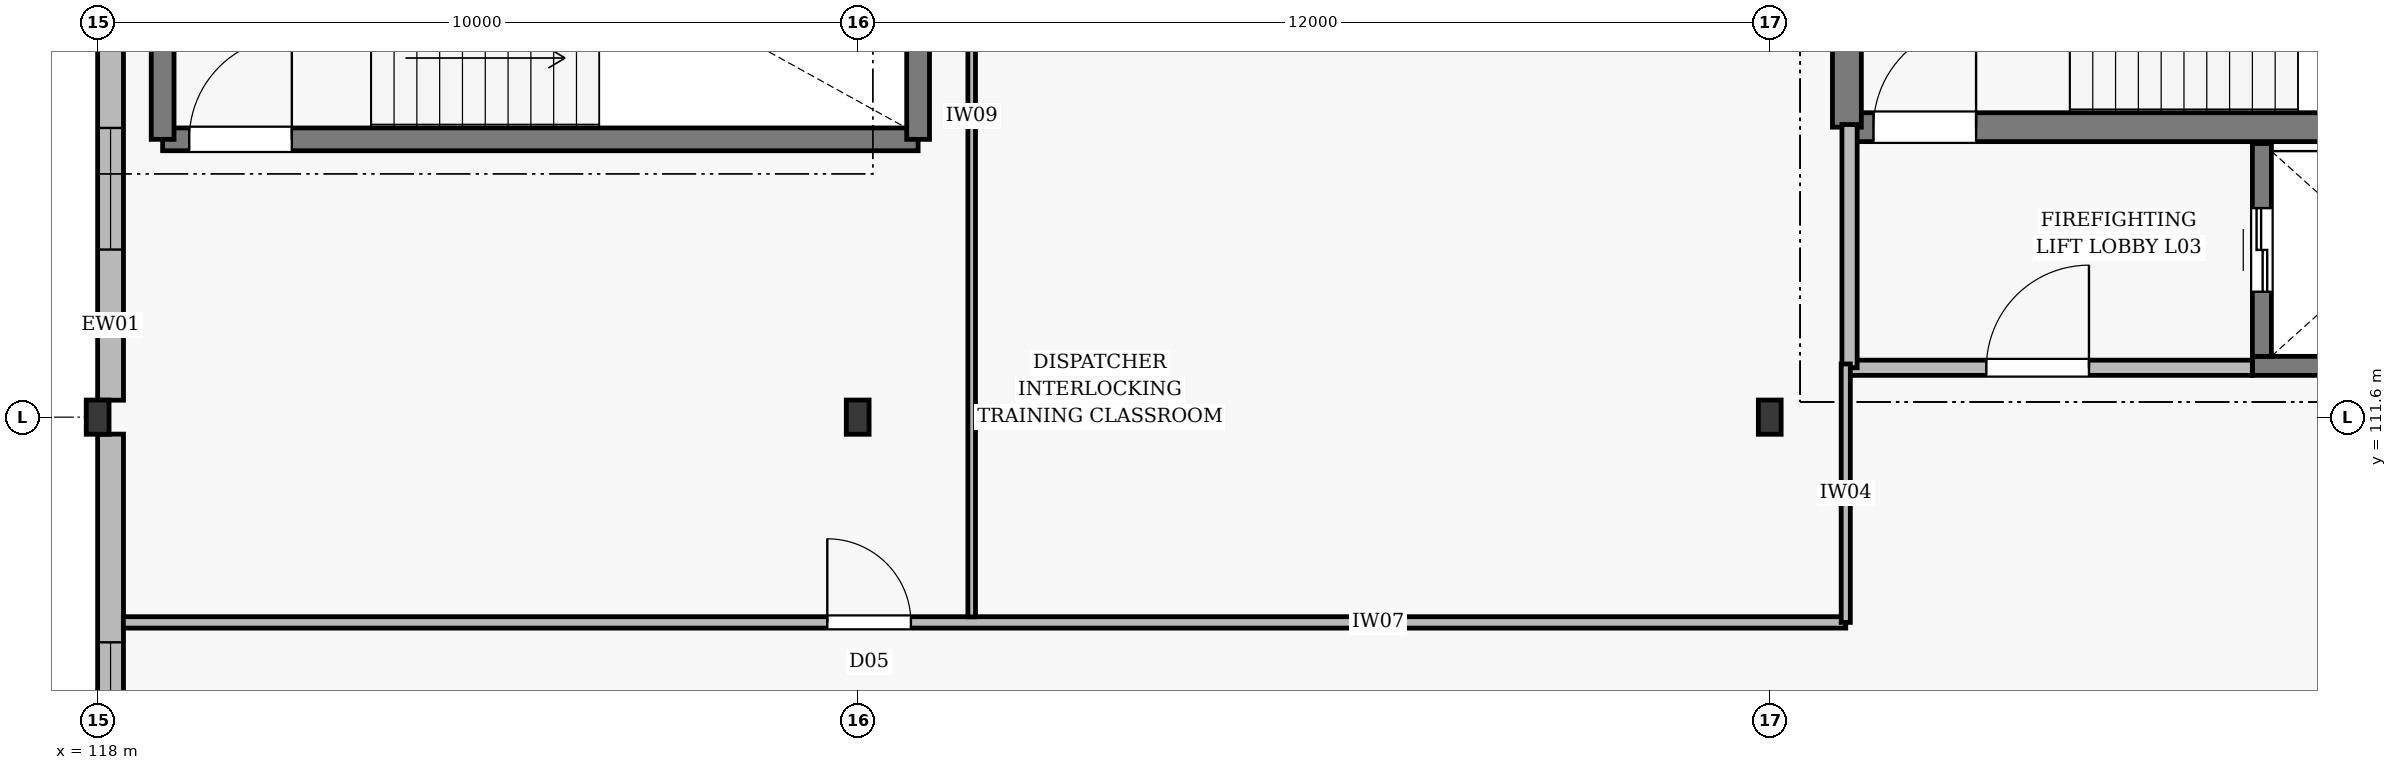
"""IFC4 building model, lengths in metres.
Left out: names, types, materials, properties, quantities, classifications, styles, units other than length and angle.
Written with IfcOpenShell. Run it as: python <this file> out.ifc"""

import sys

from ifc_helpers import new_model, si_unit, direction, frame, frame_2d, origin, origin_2d, place, context, subcontext, project, spatial, rectangle, i_section, extrude, element, fill, save


model = new_model("IFC4")
c1 = context("Model", 3, precision=1e-05, world=origin(), true_north=direction((0.0, 1.0)))
c2 = subcontext(c1, "Body", "Model", "MODEL_VIEW")
j1 = project(units=[si_unit("LENGTHUNIT", "METRE"), si_unit("PLANEANGLEUNIT", "RADIAN")], contexts=[c1])
p1 = place(None, origin())
s1 = spatial("IfcSite", under=j1, at=p1, CompositionType="ELEMENT")
p2 = place(p1, origin())
s2 = spatial("IfcBuilding", under=s1, at=p2, CompositionType="ELEMENT")
p3 = place(p2, frame((0.0, 0.0, 17.4)))
s3 = spatial("IfcBuildingStorey", under=s2, at=p3, CompositionType="ELEMENT", Elevation=17.4)
for number, where, z_axis, x_axis in (
    (1, (118.0, 111.6, 0.0), (0.0, 0.0, 1.0), (1.0, 0.0, 0.0)),
    (2, (128.0, 111.6, 0.0), (0.0, 0.0, 1.0), (1.0, 0.0, 0.0)),
    (3, (140.0, 111.6, 0.0), (0.0, 0.0, 1.0), (1.0, 0.0, 0.0)),
):
    element("IfcColumn", number, at=place(p3, frame(where, z_axis=z_axis, x_axis=x_axis)), inside=s3, PredefinedType="COLUMN", context=c2, shape_type="SweptSolid", body=[
        extrude(i_section(OverallWidth=0.3, OverallDepth=0.45, WebThickness=0.014, FlangeThickness=0.026, at=origin_2d()), origin(), (0.0, 0.0, 1.0), 3.9),
    ])
p4 = place(p3, frame((118.17, 101.023, 0.0), z_axis=(0.0, 0.0, 1.0), x_axis=(0.0, 1.0, 0.0)))
e4 = element("IfcWall", 4, at=p4, inside=s3, PredefinedType="STANDARD", context=c2, shape_type="SweptSolid", body=[
    extrude(rectangle(XDim=10.354, YDim=0.34, at=frame_2d((5.177, 0.0))), origin(), (0.0, 0.0, 1.0), 3.22),
])
p5 = place(p4, frame((5.015, 0.0, 0.58)))
e5 = element("IfcOpeningElement", 5, at=p5, cuts=e4, PredefinedType="OPENING", context=c2, shape_type="SweptSolid", body=[
    extrude(rectangle(XDim=2.6, YDim=2.4, at=frame_2d((1.3, 1.2))), frame((0.0, 0.182, 0.0), z_axis=(0.0, -1.0, 0.0), x_axis=(1.0, 0.0, 0.0)), (0.0, 0.0, 1.0), 0.364),
])
p6 = place(p3, frame((118.17, 111.823, 0.0), z_axis=(0.0, 0.0, 1.0), x_axis=(0.0, 1.0, 0.0)))
e6 = element("IfcWall", 6, at=p6, inside=s3, PredefinedType="STANDARD", context=c2, shape_type="SweptSolid", body=[
    extrude(rectangle(XDim=10.329, YDim=0.34, at=frame_2d((5.165, 0.0))), origin(), (0.0, 0.0, 1.0), 3.22),
])
p7 = place(p6, frame((1.982, 0.0, 0.75)))
e7 = element("IfcOpeningElement", 7, at=p7, cuts=e6, PredefinedType="OPENING", context=c2, shape_type="SweptSolid", body=[
    extrude(rectangle(XDim=1.6, YDim=2.1, at=frame_2d((0.8, 1.05))), frame((0.0, 0.182, 0.0), z_axis=(0.0, -1.0, 0.0), x_axis=(1.0, 0.0, 0.0)), (0.0, 0.0, 1.0), 0.364),
])
p8 = place(p6, frame((6.747, 0.0, 0.75)))
e8 = element("IfcOpeningElement", 8, at=p8, cuts=e6, PredefinedType="OPENING", context=c2, shape_type="SweptSolid", body=[
    extrude(rectangle(XDim=1.6, YDim=2.1, at=frame_2d((0.8, 1.05))), frame((0.0, 0.182, 0.0), z_axis=(0.0, -1.0, 0.0), x_axis=(1.0, 0.0, 0.0)), (0.0, 0.0, 1.0), 0.364),
])
p9 = place(p3, frame((141.015, 115.415, 0.0), z_axis=(0.0, 0.0, 1.0), x_axis=(1.0, 0.0, 0.0)))
e9 = element("IfcWall", 9, at=p9, inside=s3, PredefinedType="SOLIDWALL", context=c2, shape_type="SweptSolid", body=[
    extrude(rectangle(XDim=10.17, YDim=0.38, at=frame_2d((5.085, 0.0))), origin(), (0.0, 0.0, 1.0), 3.9),
])
p10 = place(p9, frame((0.35, 0.0, 0.005)))
e10 = element("IfcOpeningElement", 10, at=p10, cuts=e9, PredefinedType="OPENING", context=c2, shape_type="SweptSolid", body=[
    extrude(rectangle(XDim=1.35, YDim=2.15, at=frame_2d((0.675, 1.075))), frame((0.0, 0.202, 0.0), z_axis=(0.0, -1.0, 0.0), x_axis=(1.0, 0.0, 0.0)), (0.0, 0.0, 1.0), 0.404),
])
p11 = place(p3, frame((141.015, 115.415, 0.0), z_axis=(0.0, 0.0, 1.0), x_axis=(0.0, 1.0, 0.0)))
e11 = element("IfcWall", 11, at=p11, inside=s3, PredefinedType="SOLIDWALL", context=c2, shape_type="SweptSolid", body=[
    extrude(rectangle(XDim=4.47, YDim=0.38, at=frame_2d((2.235, 0.0))), origin(), (0.0, 0.0, 1.0), 3.9),
])
p12 = place(p3, frame((118.855, 115.255, 0.0), z_axis=(0.0, 0.0, 1.0), x_axis=(1.0, 0.0, 0.0)))
e12 = element("IfcWall", 12, at=p12, inside=s3, PredefinedType="SOLIDWALL", context=c2, shape_type="SweptSolid", body=[
    extrude(rectangle(XDim=9.94, YDim=0.3, at=frame_2d((4.97, 0.0))), origin(), (0.0, 0.0, 1.0), 3.9),
])
p13 = place(p12, frame((0.35, 0.0, 0.005)))
e13 = element("IfcOpeningElement", 13, at=p13, cuts=e12, PredefinedType="OPENING", context=c2, shape_type="SweptSolid", body=[
    extrude(rectangle(XDim=1.35, YDim=2.15, at=frame_2d((0.675, 1.075))), frame((0.0, 0.162, 0.0), z_axis=(0.0, -1.0, 0.0), x_axis=(1.0, 0.0, 0.0)), (0.0, 0.0, 1.0), 0.324),
])
for number, where, z_axis, x_axis in (
    (14, (118.855, 115.255, 0.0), (0.0, 0.0, 1.0), (0.0, 1.0, 0.0)),
    (15, (128.795, 115.255, 0.0), (0.0, 0.0, 1.0), (0.0, 1.0, 0.0)),
):
    element("IfcWall", number, at=place(p3, frame(where, z_axis=z_axis, x_axis=x_axis)), inside=s3, PredefinedType="SOLIDWALL", context=c2, shape_type="SweptSolid", body=[
        extrude(rectangle(XDim=4.19, YDim=0.3, at=frame_2d((2.095, 0.0))), origin(), (0.0, 0.0, 1.0), 3.9),
    ])
p14 = place(p3, frame((146.35, 112.275, 0.0), z_axis=(0.0, 0.0, 1.0), x_axis=(1.0, 0.0, 0.0)))
e16 = element("IfcWall", 16, at=p14, inside=s3, PredefinedType="SOLIDWALL", context=c2, shape_type="SweptSolid", body=[
    extrude(rectangle(XDim=3.5, YDim=0.25, at=frame_2d((1.75, 0.0))), origin(), (0.0, 0.0, 1.0), 3.9),
])
p15 = place(p3, frame((146.475, 112.4, 0.0), z_axis=(0.0, 0.0, 1.0), x_axis=(0.0, 1.0, 0.0)))
e17 = element("IfcWall", 17, at=p15, inside=s3, PredefinedType="SOLIDWALL", context=c2, shape_type="SweptSolid", body=[
    extrude(rectangle(XDim=2.8, YDim=0.25, at=frame_2d((1.4, 0.0))), origin(), (0.0, 0.0, 1.0), 3.9),
])
p16 = place(p15, frame((0.85, 0.0, 0.005)))
e18 = element("IfcOpeningElement", 18, at=p16, cuts=e17, PredefinedType="OPENING", context=c2, shape_type="SweptSolid", body=[
    extrude(rectangle(XDim=1.1, YDim=2.15, at=frame_2d((0.55, 1.075))), frame((0.0, 0.137, 0.0), z_axis=(0.0, -1.0, 0.0), x_axis=(1.0, 0.0, 0.0)), (0.0, 0.0, 1.0), 0.274),
])
p17 = place(p3, frame((141.05, 112.25, 0.0), z_axis=(0.0, 0.0, 1.0), x_axis=(1.0, 0.0, 0.0)))
e19 = element("IfcWall", 19, at=p17, inside=s3, PredefinedType="PARTITIONING", context=c2, shape_type="SweptSolid", body=[
    extrude(rectangle(XDim=5.3, YDim=0.2, at=frame_2d((2.65, 0.0))), origin(), (0.0, 0.0, 1.0), 3.5),
])
p18 = place(p17, frame((1.8, 0.0, 0.005)))
e20 = element("IfcOpeningElement", 20, at=p18, cuts=e19, PredefinedType="OPENING", context=c2, shape_type="SweptSolid", body=[
    extrude(rectangle(XDim=1.35, YDim=2.15, at=frame_2d((0.675, 1.075))), frame((0.0, 0.112, 0.0), z_axis=(0.0, -1.0, 0.0), x_axis=(1.0, 0.0, 0.0)), (0.0, 0.0, 1.0), 0.224),
])
p19 = place(p3, frame((141.05, 112.25, 0.0), z_axis=(0.0, 0.0, 1.0), x_axis=(0.0, 1.0, 0.0)))
e21 = element("IfcWall", 21, at=p19, inside=s3, PredefinedType="PARTITIONING", context=c2, shape_type="SweptSolid", body=[
    extrude(rectangle(XDim=3.2, YDim=0.2, at=frame_2d((1.6, 0.0))), origin(), (0.0, 0.0, 1.0), 3.5),
])
p20 = place(p3, frame((118.338, 108.9, 0.0), z_axis=(0.0, 0.0, 1.0), x_axis=(1.0, 0.0, 0.0)))
e22 = element("IfcWall", 22, at=p20, inside=s3, PredefinedType="PARTITIONING", context=c2, shape_type="SweptSolid", body=[
    extrude(rectangle(XDim=22.662, YDim=0.15, at=frame_2d((11.331, 0.0))), origin(), (0.0, 0.0, 1.0), 3.31),
])
p21 = place(p20, frame((9.262, 0.0, 0.005)))
e23 = element("IfcOpeningElement", 23, at=p21, cuts=e22, PredefinedType="OPENING", context=c2, shape_type="SweptSolid", body=[
    extrude(rectangle(XDim=1.1, YDim=2.1, at=frame_2d((0.55, 1.05))), frame((0.0, 0.087, 0.0), z_axis=(0.0, -1.0, 0.0), x_axis=(1.0, 0.0, 0.0)), (0.0, 0.0, 1.0), 0.174),
])
p22 = place(p3, frame((141.0, 108.9, 0.0), z_axis=(0.0, 0.0, 1.0), x_axis=(0.0, 1.0, 0.0)))
e24 = element("IfcWall", 24, at=p22, inside=s3, PredefinedType="PARTITIONING", context=c2, shape_type="SweptSolid", body=[
    extrude(rectangle(XDim=3.4, YDim=0.12, at=frame_2d((1.7, 0.0))), origin(), (0.0, 0.0, 1.0), 3.12),
])
p23 = place(p3, frame((129.5, 108.973, 0.0), z_axis=(0.0, 0.0, 1.0), x_axis=(0.0, 1.0, 0.0)))
e25 = element("IfcWall", 25, at=p23, inside=s3, PredefinedType="MOVABLE", context=c2, shape_type="SweptSolid", body=[
    extrude(rectangle(XDim=13.189, YDim=0.1, at=frame_2d((6.595, 0.0))), origin(), (0.0, 0.0, 1.0), 3.22),
])
p24 = place(p5, origin())
e26 = element("IfcWindow", 26, at=p24, inside=s3, PartitioningType="DOUBLE_PANEL_VERTICAL", PredefinedType="WINDOW", context=c2, shape_type="SweptSolid", body=[
    extrude(rectangle(XDim=2.6, YDim=2.4, at=frame_2d((1.3, 1.2))), frame((0.0, 0.03, 0.0), z_axis=(0.0, -1.0, 0.0), x_axis=(1.0, 0.0, 0.0)), (0.0, 0.0, 1.0), 0.06),
])
fill(e5, e26)
p25 = place(p7, origin())
e27 = element("IfcWindow", 27, at=p25, inside=s3, PartitioningType="DOUBLE_PANEL_VERTICAL", PredefinedType="WINDOW", context=c2, shape_type="SweptSolid", body=[
    extrude(rectangle(XDim=1.6, YDim=2.1, at=frame_2d((0.8, 1.05))), frame((0.0, 0.03, 0.0), z_axis=(0.0, -1.0, 0.0), x_axis=(1.0, 0.0, 0.0)), (0.0, 0.0, 1.0), 0.06),
])
fill(e7, e27)
p26 = place(p10, origin())
e28 = element("IfcDoor", 28, at=p26, inside=s3, OperationType="SINGLE_SWING_RIGHT", PredefinedType="DOOR", context=c2, shape_type="SweptSolid", body=[
    extrude(rectangle(XDim=1.35, YDim=2.15, at=frame_2d((0.675, 1.075))), frame((0.0, 0.025, 0.0), z_axis=(0.0, -1.0, 0.0), x_axis=(1.0, 0.0, 0.0)), (0.0, 0.0, 1.0), 0.05),
])
fill(e10, e28)
p27 = place(p13, origin())
e29 = element("IfcDoor", 29, at=p27, inside=s3, OperationType="SINGLE_SWING_RIGHT", PredefinedType="DOOR", context=c2, shape_type="SweptSolid", body=[
    extrude(rectangle(XDim=1.35, YDim=2.15, at=frame_2d((0.675, 1.075))), frame((0.0, 0.025, 0.0), z_axis=(0.0, -1.0, 0.0), x_axis=(1.0, 0.0, 0.0)), (0.0, 0.0, 1.0), 0.05),
])
fill(e13, e29)
p28 = place(p16, origin())
e30 = element("IfcDoor", 30, at=p28, inside=s3, OperationType="SLIDING_TO_LEFT", PredefinedType="DOOR", context=c2, shape_type="SweptSolid", body=[
    extrude(rectangle(XDim=1.1, YDim=2.15, at=frame_2d((0.55, 1.075))), frame((0.0, 0.025, 0.0), z_axis=(0.0, -1.0, 0.0), x_axis=(1.0, 0.0, 0.0)), (0.0, 0.0, 1.0), 0.05),
])
fill(e18, e30)
p29 = place(p18, origin())
e31 = element("IfcDoor", 31, at=p29, inside=s3, OperationType="SINGLE_SWING_RIGHT", PredefinedType="DOOR", context=c2, shape_type="SweptSolid", body=[
    extrude(rectangle(XDim=1.35, YDim=2.15, at=frame_2d((0.675, 1.075))), frame((0.0, 0.025, 0.0), z_axis=(0.0, -1.0, 0.0), x_axis=(1.0, 0.0, 0.0)), (0.0, 0.0, 1.0), 0.05),
])
fill(e20, e31)
p30 = place(p21, origin())
e32 = element("IfcDoor", 32, at=p30, inside=s3, OperationType="SINGLE_SWING_LEFT", PredefinedType="DOOR", context=c2, shape_type="SweptSolid", body=[
    extrude(rectangle(XDim=1.1, YDim=2.1, at=frame_2d((0.55, 1.05))), frame((0.0, 0.025, 0.0), z_axis=(0.0, -1.0, 0.0), x_axis=(1.0, 0.0, 0.0)), (0.0, 0.0, 1.0), 0.05),
])
fill(e23, e32)
save(model, sys.argv[1])
